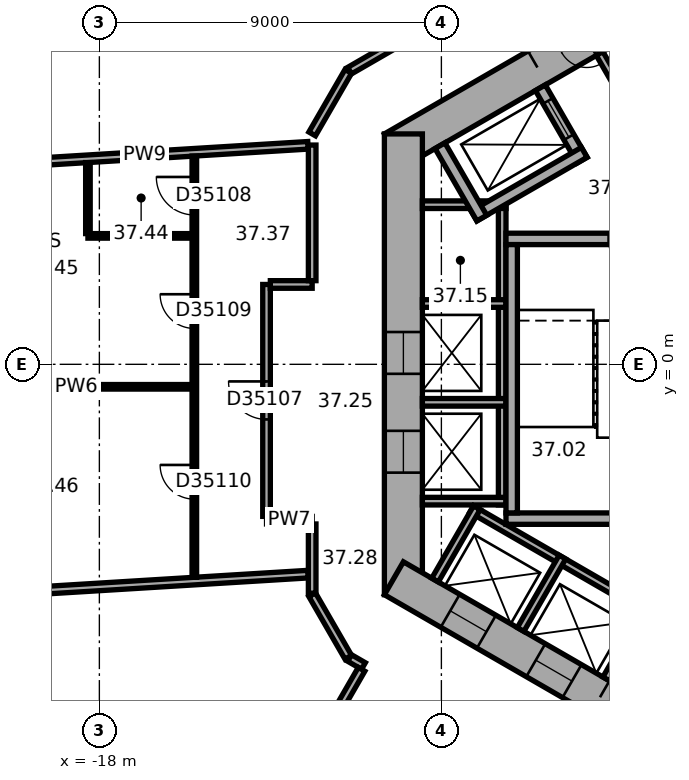
"""IFC4 building model, lengths in metres.
Left out: names, types, materials, properties, quantities, classifications, styles, units other than length and angle.
Written with IfcOpenShell. Run it as: python <this file> out.ifc"""

import sys

from ifc_helpers import new_model, si_unit, direction, frame, frame_2d, origin, place, context, subcontext, project, spatial, rectangle, extrude, element, fill, save


model = new_model("IFC4")
c1 = context("Model", 3, precision=1e-05, world=origin(), true_north=direction((0.0, 1.0)))
c2 = subcontext(c1, "Body", "Model", "MODEL_VIEW")
j1 = project(units=[si_unit("LENGTHUNIT", "METRE"), si_unit("PLANEANGLEUNIT", "RADIAN")], contexts=[c1])
p1 = place(None, origin())
s1 = spatial("IfcSite", under=j1, at=p1, CompositionType="ELEMENT")
p2 = place(p1, origin())
s2 = spatial("IfcBuilding", under=s1, at=p2, CompositionType="ELEMENT")
p3 = place(p2, frame((0.0, 0.0, 154.0)))
s3 = spatial("IfcBuildingStorey", under=s2, at=p3, CompositionType="ELEMENT", Elevation=154.0)
p4 = place(p3, frame((0.25, 11.691, 0.0), z_axis=(0.0, 0.0, 1.0), x_axis=(-0.866022616891, -0.50000482701, 0.0)))
e1 = element("IfcWall", 1, at=p4, inside=s3, PredefinedType="SHEAR", context=c2, shape_type="SweptSolid", body=[
    extrude(rectangle(XDim=12.125, YDim=1.0, at=frame_2d((6.062, 0.0))), origin(), (0.0, 0.0, 1.0), 3.7),
])
p5 = place(p4, frame((6.262, 0.0, 0.0)))
e2 = element("IfcOpeningElement", 2, at=p5, cuts=e1, PredefinedType="OPENING", context=c2, shape_type="SweptSolid", body=[
    extrude(rectangle(XDim=1.5, YDim=2.1, at=frame_2d((0.75, 1.05))), frame((0.0, 0.51, 0.0), z_axis=(0.0, -1.0, 0.0), x_axis=(1.0, 0.0, 0.0)), (0.0, 0.0, 1.0), 1.02),
])
p6 = place(p4, frame((1.812, 0.0, 0.0)))
e3 = element("IfcOpeningElement", 3, at=p6, cuts=e1, PredefinedType="OPENING", context=c2, shape_type="SweptSolid", body=[
    extrude(rectangle(XDim=0.9, YDim=2.1, at=frame_2d((0.45, 1.05))), frame((0.0, 0.51, 0.0), z_axis=(0.0, -1.0, 0.0), x_axis=(1.0, 0.0, 0.0)), (0.0, 0.0, 1.0), 1.02),
])
p7 = place(p4, frame((4.412, 0.0, 0.0)))
e4 = element("IfcOpeningElement", 4, at=p7, cuts=e1, PredefinedType="OPENING", context=c2, shape_type="SweptSolid", body=[
    extrude(rectangle(XDim=0.9, YDim=2.1, at=frame_2d((0.45, 1.05))), frame((0.0, 0.51, 0.0), z_axis=(0.0, -1.0, 0.0), x_axis=(1.0, 0.0, 0.0)), (0.0, 0.0, 1.0), 1.02),
])
p8 = place(p3, frame((-10.0, 6.062, 0.0), z_axis=(0.0, 0.0, 1.0), x_axis=(0.0, -1.0, 0.0)))
e5 = element("IfcWall", 5, at=p8, inside=s3, PredefinedType="SHEAR", context=c2, shape_type="SweptSolid", body=[
    extrude(rectangle(XDim=12.125, YDim=1.0, at=frame_2d((6.062, 0.0))), origin(), (0.0, 0.0, 1.0), 3.7),
])
p9 = place(p8, frame((5.212, 0.0, 0.0)))
e6 = element("IfcOpeningElement", 6, at=p9, cuts=e5, PredefinedType="OPENING", context=c2, shape_type="SweptSolid", body=[
    extrude(rectangle(XDim=1.1, YDim=2.1, at=frame_2d((0.55, 1.05))), frame((0.0, 0.51, 0.0), z_axis=(0.0, -1.0, 0.0), x_axis=(1.0, 0.0, 0.0)), (0.0, 0.0, 1.0), 1.02),
])
p10 = place(p8, frame((7.812, 0.0, 0.0)))
e7 = element("IfcOpeningElement", 7, at=p10, cuts=e5, PredefinedType="OPENING", context=c2, shape_type="SweptSolid", body=[
    extrude(rectangle(XDim=1.1, YDim=2.1, at=frame_2d((0.55, 1.05))), frame((0.0, 0.51, 0.0), z_axis=(0.0, -1.0, 0.0), x_axis=(1.0, 0.0, 0.0)), (0.0, 0.0, 1.0), 1.02),
])
p11 = place(p3, frame((-10.25, -5.629, 0.0), z_axis=(0.0, 0.0, 1.0), x_axis=(0.866022616891, -0.50000482701, 0.0)))
e8 = element("IfcWall", 8, at=p11, inside=s3, PredefinedType="SHEAR", context=c2, shape_type="SweptSolid", body=[
    extrude(rectangle(XDim=12.125, YDim=1.0, at=frame_2d((6.062, 0.0))), origin(), (0.0, 0.0, 1.0), 3.7),
])
p12 = place(p11, frame((6.262, 0.0, 0.0)))
e9 = element("IfcOpeningElement", 9, at=p12, cuts=e8, PredefinedType="OPENING", context=c2, shape_type="SweptSolid", body=[
    extrude(rectangle(XDim=1.5, YDim=2.1, at=frame_2d((0.75, 1.05))), frame((0.0, 0.51, 0.0), z_axis=(0.0, -1.0, 0.0), x_axis=(1.0, 0.0, 0.0)), (0.0, 0.0, 1.0), 1.02),
])
p13 = place(p11, frame((1.712, 0.0, 0.0)))
e10 = element("IfcOpeningElement", 10, at=p13, cuts=e8, PredefinedType="OPENING", context=c2, shape_type="SweptSolid", body=[
    extrude(rectangle(XDim=1.1, YDim=2.1, at=frame_2d((0.55, 1.05))), frame((0.0, 0.51, 0.0), z_axis=(0.0, -1.0, 0.0), x_axis=(1.0, 0.0, 0.0)), (0.0, 0.0, 1.0), 1.02),
])
p14 = place(p11, frame((4.312, 0.0, 0.0)))
e11 = element("IfcOpeningElement", 11, at=p14, cuts=e8, PredefinedType="OPENING", context=c2, shape_type="SweptSolid", body=[
    extrude(rectangle(XDim=1.1, YDim=2.1, at=frame_2d((0.55, 1.05))), frame((0.0, 0.51, 0.0), z_axis=(0.0, -1.0, 0.0), x_axis=(1.0, 0.0, 0.0)), (0.0, 0.0, 1.0), 1.02),
])
p15 = place(p3, frame((-3.737, 6.272, 0.0), z_axis=(0.0, 0.0, 1.0), x_axis=(-0.50002983664, 0.866008176907, 0.0)))
e12 = element("IfcWall", 12, at=p15, inside=s3, PredefinedType="PARTITIONING", context=c2, shape_type="SweptSolid", body=[
    extrude(rectangle(XDim=2.2, YDim=0.2, at=frame_2d((1.1, 0.0))), origin(), (0.0, 0.0, 1.0), 3.42),
])
p16 = place(p3, frame((-7.4, 4.3, 0.0), z_axis=(0.0, 0.0, 1.0), x_axis=(0.0, -1.0, 0.0)))
e13 = element("IfcWall", 13, at=p16, inside=s3, PredefinedType="PARTITIONING", context=c2, shape_type="SweptSolid", body=[
    extrude(rectangle(XDim=8.0, YDim=0.2, at=frame_2d((4.0, 0.0))), origin(), (0.0, 0.0, 1.0), 3.42),
])
for number, where, z_axis, x_axis in (
    (14, (-7.3, 4.2, 0.0), (0.0, 0.0, 1.0), (-1.0, 0.0, 0.0)),
    (15, (-7.3, 1.6, 0.0), (0.0, 0.0, 1.0), (-1.0, 0.0, 0.0)),
    (16, (-7.3, -1.0, 0.0), (0.0, 0.0, 1.0), (-1.0, 0.0, 0.0)),
    (17, (-7.3, -3.6, 0.0), (0.0, 0.0, 1.0), (-1.0, 0.0, 0.0)),
):
    element("IfcWall", number, at=place(p3, frame(where, z_axis=z_axis, x_axis=x_axis)), inside=s3, PredefinedType="PARTITIONING", context=c2, shape_type="SweptSolid", body=[
        extrude(rectangle(XDim=2.2, YDim=0.2, at=frame_2d((1.1, 0.0))), origin(), (0.0, 0.0, 1.0), 3.42),
    ])
p17 = place(p3, frame((-8.203, -3.809, 0.0), z_axis=(0.0, 0.0, 1.0), x_axis=(0.866028230842, -0.499995103361, 0.0)))
e18 = element("IfcWall", 18, at=p17, inside=s3, PredefinedType="PARTITIONING", context=c2, shape_type="SweptSolid", body=[
    extrude(rectangle(XDim=5.4, YDim=0.2, at=frame_2d((2.7, 0.0))), origin(), (0.0, 0.0, 1.0), 3.42),
])
for number, where, z_axis, x_axis in (
    (19, (-8.067, -3.772, 0.0), (0.0, 0.0, 1.0), (-0.5, -0.866, 0.0)),
    (20, (-5.815, -5.072, 0.0), (0.0, 0.0, 1.0), (-0.5, -0.866, 0.0)),
):
    element("IfcWall", number, at=place(p3, frame(where, z_axis=z_axis, x_axis=x_axis)), inside=s3, PredefinedType="PARTITIONING", context=c2, shape_type="SweptSolid", body=[
        extrude(rectangle(XDim=2.2, YDim=0.2, at=frame_2d((1.1, 0.0))), origin(), (0.0, 0.0, 1.0), 3.42),
    ])
p18 = place(p3, frame((-3.563, -6.372, 0.0), z_axis=(0.0, 0.0, 1.0), x_axis=(-0.499994660107, -0.866028486751, 0.0)))
e21 = element("IfcWall", 21, at=p18, inside=s3, PredefinedType="PARTITIONING", context=c2, shape_type="SweptSolid", body=[
    extrude(rectangle(XDim=2.2, YDim=0.2, at=frame_2d((1.1, 0.0))), origin(), (0.0, 0.0, 1.0), 3.42),
])
p19 = place(p3, frame((-2.6, 3.3, 0.0), z_axis=(0.0, 0.0, 1.0), x_axis=(-1.0, 0.0, 0.0)))
e22 = element("IfcWall", 22, at=p19, inside=s3, PredefinedType="SHEAR", context=c2, shape_type="SweptSolid", body=[
    extrude(rectangle(XDim=4.7, YDim=0.3, at=frame_2d((2.35, 0.0))), origin(), (0.0, 0.0, 1.0), 3.42),
])
p20 = place(p19, frame((0.8, 0.0, 0.0)))
e23 = element("IfcOpeningElement", 23, at=p20, cuts=e22, PredefinedType="OPENING", context=c2, shape_type="SweptSolid", body=[
    extrude(rectangle(XDim=1.2, YDim=2.1, at=frame_2d((0.6, 1.05))), frame((0.0, 0.16, 0.0), z_axis=(0.0, -1.0, 0.0), x_axis=(1.0, 0.0, 0.0)), (0.0, 0.0, 1.0), 0.32),
])
p21 = place(p3, frame((-2.6, -4.06, 0.0), z_axis=(0.0, 0.0, 1.0), x_axis=(-1.0, 0.0, 0.0)))
e24 = element("IfcWall", 24, at=p21, inside=s3, PredefinedType="SHEAR", context=c2, shape_type="SweptSolid", body=[
    extrude(rectangle(XDim=4.7, YDim=0.3, at=frame_2d((2.35, 0.0))), origin(), (0.0, 0.0, 1.0), 3.42),
])
p22 = place(p3, frame((-7.15, 3.15, 0.0), z_axis=(0.0, 0.0, 1.0), x_axis=(0.0, -1.0, 0.0)))
e25 = element("IfcWall", 25, at=p22, inside=s3, PredefinedType="SHEAR", context=c2, shape_type="SweptSolid", body=[
    extrude(rectangle(XDim=7.06, YDim=0.3, at=frame_2d((3.53, 0.0))), origin(), (0.0, 0.0, 1.0), 3.42),
])
p23 = place(p3, frame((-5.295, 5.372, 0.0), z_axis=(0.0, 0.0, 1.0), x_axis=(-0.500077893725, 0.86598042715, 0.0)))
e26 = element("IfcWall", 26, at=p23, inside=s3, PredefinedType="SHEAR", context=c2, shape_type="SweptSolid", body=[
    extrude(rectangle(XDim=2.2, YDim=0.3, at=frame_2d((1.1, 0.0))), origin(), (0.0, 0.0, 1.0), 3.42),
])
p24 = place(p23, frame((0.7, 0.0, 0.0)))
e27 = element("IfcOpeningElement", 27, at=p24, cuts=e26, PredefinedType="OPENING", context=c2, shape_type="SweptSolid", body=[
    extrude(rectangle(XDim=1.1, YDim=2.1, at=frame_2d((0.55, 1.05))), frame((0.0, 0.16, 0.0), z_axis=(0.0, -1.0, 0.0), x_axis=(1.0, 0.0, 0.0)), (0.0, 0.0, 1.0), 0.32),
])
p25 = place(p3, frame((-5.24, 5.577, 0.0), z_axis=(0.0, 0.0, 1.0), x_axis=(-0.866014461049, -0.500018952895, 0.0)))
e28 = element("IfcWall", 28, at=p25, inside=s3, PredefinedType="SHEAR", context=c2, shape_type="SweptSolid", body=[
    extrude(rectangle(XDim=3.35, YDim=0.3, at=frame_2d((1.675, 0.0))), origin(), (0.0, 0.0, 1.0), 3.42),
])
p26 = place(p3, frame((-7.937, 3.847, 0.0), z_axis=(0.0, 0.0, 1.0), x_axis=(-0.50002983664, 0.866008176907, 0.0)))
e29 = element("IfcWall", 29, at=p26, inside=s3, PredefinedType="SHEAR", context=c2, shape_type="SweptSolid", body=[
    extrude(rectangle(XDim=2.2, YDim=0.3, at=frame_2d((1.1, 0.0))), origin(), (0.0, 0.0, 1.0), 3.42),
])
p27 = place(p3, frame((-21.654, -0.592, 0.0), z_axis=(0.0, 0.0, 1.0), x_axis=(1.0, 0.0, 0.0)))
e30 = element("IfcWall", 30, at=p27, inside=s3, PredefinedType="PARTITIONING", context=c2, shape_type="SweptSolid", body=[
    extrude(rectangle(XDim=6.093, YDim=0.12, at=frame_2d((3.046, 0.0))), origin(), (0.0, 0.0, 1.0), 3.42),
])
p28 = place(p3, frame((-21.109, 5.237, 0.0), z_axis=(0.0, 0.0, 1.0), x_axis=(0.998135264293, 0.061040922131, 0.0)))
e31 = element("IfcWall", 31, at=p28, inside=s3, PredefinedType="PARTITIONING", context=c2, shape_type="SweptSolid", body=[
    extrude(rectangle(XDim=8.615, YDim=0.2, at=frame_2d((4.308, 0.0))), origin(), (0.0, 0.0, 1.0), 3.42),
])
p29 = place(p3, frame((-20.421, -6.005, 0.0), z_axis=(0.0, 0.0, 1.0), x_axis=(0.998134865741, 0.061047438866, 0.0)))
e32 = element("IfcWall", 32, at=p29, inside=s3, PredefinedType="PARTITIONING", context=c2, shape_type="SweptSolid", body=[
    extrude(rectangle(XDim=7.927, YDim=0.2, at=frame_2d((3.963, 0.0))), origin(), (0.0, 0.0, 1.0), 2.87),
])
p30 = place(p3, frame((-18.301, 3.38, 0.0), z_axis=(0.0, 0.0, 1.0), x_axis=(1.0, 0.0, 0.0)))
e33 = element("IfcWall", 33, at=p30, inside=s3, PredefinedType="PARTITIONING", context=c2, shape_type="SweptSolid", body=[
    extrude(rectangle(XDim=2.74, YDim=0.12, at=frame_2d((1.37, 0.0))), origin(), (0.0, 0.0, 1.0), 3.42),
])
p31 = place(p3, frame((-18.301, 5.308, 0.0), z_axis=(0.0, 0.0, 1.0), x_axis=(0.0, -1.0, 0.0)))
e34 = element("IfcWall", 34, at=p31, inside=s3, PredefinedType="PARTITIONING", context=c2, shape_type="SweptSolid", body=[
    extrude(rectangle(XDim=1.869, YDim=0.12, at=frame_2d((0.934, 0.0))), origin(), (0.0, 0.0, 1.0), 3.42),
])
p32 = place(p3, frame((-15.501, 5.479, 0.0), z_axis=(0.0, 0.0, 1.0), x_axis=(0.0, -1.0, 0.0)))
e35 = element("IfcWall", 35, at=p32, inside=s3, PredefinedType="PARTITIONING", context=c2, shape_type="SweptSolid", body=[
    extrude(rectangle(XDim=11.083, YDim=0.12, at=frame_2d((5.542, 0.0))), origin(), (0.0, 0.0, 1.0), 3.42),
])
p33 = place(p32, frame((0.55, 0.0, 0.0)))
e36 = element("IfcOpeningElement", 36, at=p33, cuts=e35, PredefinedType="OPENING", context=c2, shape_type="SweptSolid", body=[
    extrude(rectangle(XDim=1.0, YDim=2.1, at=frame_2d((0.5, 1.05))), frame((0.0, 0.07, 0.0), z_axis=(0.0, -1.0, 0.0), x_axis=(1.0, 0.0, 0.0)), (0.0, 0.0, 1.0), 0.14),
])
p34 = place(p32, frame((3.636, 0.0, 0.0)))
e37 = element("IfcOpeningElement", 37, at=p34, cuts=e35, PredefinedType="OPENING", context=c2, shape_type="SweptSolid", body=[
    extrude(rectangle(XDim=0.9, YDim=2.1, at=frame_2d((0.45, 1.05))), frame((0.0, 0.07, 0.0), z_axis=(0.0, -1.0, 0.0), x_axis=(1.0, 0.0, 0.0)), (0.0, 0.0, 1.0), 0.14),
])
p35 = place(p32, frame((8.127, 0.0, 0.0)))
e38 = element("IfcOpeningElement", 38, at=p35, cuts=e35, PredefinedType="OPENING", context=c2, shape_type="SweptSolid", body=[
    extrude(rectangle(XDim=0.9, YDim=2.1, at=frame_2d((0.45, 1.05))), frame((0.0, 0.07, 0.0), z_axis=(0.0, -1.0, 0.0), x_axis=(1.0, 0.0, 0.0)), (0.0, 0.0, 1.0), 0.14),
])
p36 = place(p3, frame((-13.601, -4.101, 0.0), z_axis=(0.0, 0.0, 1.0), x_axis=(1.0, 0.0, 0.0)))
e39 = element("IfcWall", 39, at=p36, inside=s3, PredefinedType="PARTITIONING", context=c2, shape_type="SweptSolid", body=[
    extrude(rectangle(XDim=1.201, YDim=0.2, at=frame_2d((0.601, 0.0))), origin(), (0.0, 0.0, 1.0), 3.42),
])
p37 = place(p3, frame((-13.601, 2.101, 0.0), z_axis=(0.0, 0.0, 1.0), x_axis=(0.0, -1.0, 0.0)))
e40 = element("IfcWall", 40, at=p37, inside=s3, PredefinedType="PARTITIONING", context=c2, shape_type="SweptSolid", body=[
    extrude(rectangle(XDim=6.102, YDim=0.2, at=frame_2d((3.051, 0.0))), origin(), (0.0, 0.0, 1.0), 3.42),
])
p38 = place(p37, frame((2.551, 0.0, 0.0)))
e41 = element("IfcOpeningElement", 41, at=p38, cuts=e40, PredefinedType="OPENING", context=c2, shape_type="SweptSolid", body=[
    extrude(rectangle(XDim=1.0, YDim=2.1, at=frame_2d((0.5, 1.05))), frame((0.0, 0.11, 0.0), z_axis=(0.0, -1.0, 0.0), x_axis=(1.0, 0.0, 0.0)), (0.0, 0.0, 1.0), 0.22),
])
p39 = place(p3, frame((-12.4, -6.062, 0.0), z_axis=(0.0, 0.0, 1.0), x_axis=(0.500022797313, -0.86601224135, 0.0)))
e42 = element("IfcWall", 42, at=p39, inside=s3, PredefinedType="PARTITIONING", context=c2, shape_type="SweptSolid", body=[
    extrude(rectangle(XDim=1.9, YDim=0.2, at=frame_2d((0.95, 0.0))), origin(), (0.0, 0.0, 1.0), 3.42),
])
p40 = place(p3, frame((-12.4, -4.201, 0.0), z_axis=(0.0, 0.0, 1.0), x_axis=(0.0, -1.0, 0.0)))
e43 = element("IfcWall", 43, at=p40, inside=s3, PredefinedType="PARTITIONING", context=c2, shape_type="SweptSolid", body=[
    extrude(rectangle(XDim=1.821, YDim=0.2, at=frame_2d((0.911, 0.0))), origin(), (0.0, 0.0, 1.0), 3.42),
])
p41 = place(p3, frame((-12.4, 2.101, 0.0), z_axis=(0.0, 0.0, 1.0), x_axis=(-1.0, 0.0, 0.0)))
e44 = element("IfcWall", 44, at=p41, inside=s3, PredefinedType="PARTITIONING", context=c2, shape_type="SweptSolid", body=[
    extrude(rectangle(XDim=1.101, YDim=0.2, at=frame_2d((0.551, 0.0))), origin(), (0.0, 0.0, 1.0), 3.42),
])
p42 = place(p3, frame((-12.4, 5.769, 0.0), z_axis=(0.0, 0.0, 1.0), x_axis=(0.0, -1.0, 0.0)))
e45 = element("IfcWall", 45, at=p42, inside=s3, PredefinedType="PARTITIONING", context=c2, shape_type="SweptSolid", body=[
    extrude(rectangle(XDim=3.568, YDim=0.2, at=frame_2d((1.784, 0.0))), origin(), (0.0, 0.0, 1.0), 3.42),
])
p43 = place(p3, frame((-11.45, 7.708, 0.0), z_axis=(0.0, 0.0, 1.0), x_axis=(-0.500022797313, -0.86601224135, 0.0)))
e46 = element("IfcWall", 46, at=p43, inside=s3, PredefinedType="PARTITIONING", context=c2, shape_type="SweptSolid", body=[
    extrude(rectangle(XDim=1.9, YDim=0.2, at=frame_2d((0.95, 0.0))), origin(), (0.0, 0.0, 1.0), 3.42),
])
p44 = place(p3, frame((-11.415, -7.728, 0.0), z_axis=(0.0, 0.0, 1.0), x_axis=(0.865915281873, -0.500190688257, 0.0)))
e47 = element("IfcWall", 47, at=p44, inside=s3, PredefinedType="PARTITIONING", context=c2, shape_type="SweptSolid", body=[
    extrude(rectangle(XDim=0.421, YDim=0.2, at=frame_2d((0.21, 0.0))), origin(), (0.0, 0.0, 1.0), 3.42),
])
p45 = place(p3, frame((-11.101, -8.025, 0.0), z_axis=(0.0, 0.0, 1.0), x_axis=(-0.500074377092, -0.865982457891, 0.0)))
e48 = element("IfcWall", 48, at=p45, inside=s3, PredefinedType="PARTITIONING", context=c2, shape_type="SweptSolid", body=[
    extrude(rectangle(XDim=1.101, YDim=0.2, at=frame_2d((0.55, 0.0))), origin(), (0.0, 0.0, 1.0), 3.42),
])
p46 = place(p3, frame((-8.678, 9.308, 0.0), z_axis=(0.0, 0.0, 1.0), x_axis=(-0.866000359435, -0.500043375578, 0.0)))
e49 = element("IfcWall", 49, at=p46, inside=s3, PredefinedType="PARTITIONING", context=c2, shape_type="SweptSolid", body=[
    extrude(rectangle(XDim=3.161, YDim=0.2, at=frame_2d((1.581, 0.0))), origin(), (0.0, 0.0, 1.0), 3.42),
])
p47 = place(p5, origin())
e50 = element("IfcDoor", 50, at=p47, inside=s3, OperationType="DOUBLE_DOOR_SINGLE_SWING", PredefinedType="DOOR", context=c2, shape_type="SweptSolid", body=[
    extrude(rectangle(XDim=1.5, YDim=2.1, at=frame_2d((0.75, 1.05))), frame((0.0, 0.025, 0.0), z_axis=(0.0, -1.0, 0.0), x_axis=(1.0, 0.0, 0.0)), (0.0, 0.0, 1.0), 0.05),
])
fill(e2, e50)
p48 = place(p12, origin())
e51 = element("IfcDoor", 51, at=p48, inside=s3, OperationType="DOUBLE_DOOR_SINGLE_SWING", PredefinedType="DOOR", context=c2, shape_type="SweptSolid", body=[
    extrude(rectangle(XDim=1.5, YDim=2.1, at=frame_2d((0.75, 1.05))), frame((0.0, 0.025, 0.0), z_axis=(0.0, -1.0, 0.0), x_axis=(1.0, 0.0, 0.0)), (0.0, 0.0, 1.0), 0.05),
])
fill(e9, e51)
p49 = place(p20, origin())
e52 = element("IfcDoor", 52, at=p49, inside=s3, OperationType="SINGLE_SWING_RIGHT", PredefinedType="DOOR", context=c2, shape_type="SweptSolid", body=[
    extrude(rectangle(XDim=1.2, YDim=2.1, at=frame_2d((0.6, 1.05))), frame((0.0, 0.025, 0.0), z_axis=(0.0, -1.0, 0.0), x_axis=(1.0, 0.0, 0.0)), (0.0, 0.0, 1.0), 0.05),
])
fill(e23, e52)
p50 = place(p24, origin())
e53 = element("IfcDoor", 53, at=p50, inside=s3, OperationType="DOUBLE_DOOR_SLIDING", PredefinedType="DOOR", context=c2, shape_type="SweptSolid", body=[
    extrude(rectangle(XDim=1.1, YDim=2.1, at=frame_2d((0.55, 1.05))), frame((0.0, 0.025, 0.0), z_axis=(0.0, -1.0, 0.0), x_axis=(1.0, 0.0, 0.0)), (0.0, 0.0, 1.0), 0.05),
])
fill(e27, e53)
p51 = place(p9, origin())
e54 = element("IfcDoor", 54, at=p51, inside=s3, OperationType="DOUBLE_DOOR_SLIDING", PredefinedType="DOOR", context=c2, shape_type="SweptSolid", body=[
    extrude(rectangle(XDim=1.1, YDim=2.1, at=frame_2d((0.55, 1.05))), frame((0.0, 0.025, 0.0), z_axis=(0.0, -1.0, 0.0), x_axis=(1.0, 0.0, 0.0)), (0.0, 0.0, 1.0), 0.05),
])
fill(e6, e54)
p52 = place(p10, origin())
e55 = element("IfcDoor", 55, at=p52, inside=s3, OperationType="DOUBLE_DOOR_SLIDING", PredefinedType="DOOR", context=c2, shape_type="SweptSolid", body=[
    extrude(rectangle(XDim=1.1, YDim=2.1, at=frame_2d((0.55, 1.05))), frame((0.0, 0.025, 0.0), z_axis=(0.0, -1.0, 0.0), x_axis=(1.0, 0.0, 0.0)), (0.0, 0.0, 1.0), 0.05),
])
fill(e7, e55)
p53 = place(p13, origin())
e56 = element("IfcDoor", 56, at=p53, inside=s3, OperationType="DOUBLE_DOOR_SLIDING", PredefinedType="DOOR", context=c2, shape_type="SweptSolid", body=[
    extrude(rectangle(XDim=1.1, YDim=2.1, at=frame_2d((0.55, 1.05))), frame((0.0, 0.025, 0.0), z_axis=(0.0, -1.0, 0.0), x_axis=(1.0, 0.0, 0.0)), (0.0, 0.0, 1.0), 0.05),
])
fill(e10, e56)
p54 = place(p14, origin())
e57 = element("IfcDoor", 57, at=p54, inside=s3, OperationType="DOUBLE_DOOR_SLIDING", PredefinedType="DOOR", context=c2, shape_type="SweptSolid", body=[
    extrude(rectangle(XDim=1.1, YDim=2.1, at=frame_2d((0.55, 1.05))), frame((0.0, 0.025, 0.0), z_axis=(0.0, -1.0, 0.0), x_axis=(1.0, 0.0, 0.0)), (0.0, 0.0, 1.0), 0.05),
])
fill(e11, e57)
p55 = place(p38, origin())
e58 = element("IfcDoor", 58, at=p55, inside=s3, OperationType="SINGLE_SWING_LEFT", PredefinedType="DOOR", context=c2, shape_type="SweptSolid", body=[
    extrude(rectangle(XDim=1.0, YDim=2.1, at=frame_2d((0.5, 1.05))), frame((0.0, 0.025, 0.0), z_axis=(0.0, -1.0, 0.0), x_axis=(1.0, 0.0, 0.0)), (0.0, 0.0, 1.0), 0.05),
])
fill(e41, e58)
p56 = place(p33, origin())
e59 = element("IfcDoor", 59, at=p56, inside=s3, OperationType="SINGLE_SWING_LEFT", PredefinedType="DOOR", context=c2, shape_type="SweptSolid", body=[
    extrude(rectangle(XDim=1.0, YDim=2.1, at=frame_2d((0.5, 1.05))), frame((0.0, 0.025, 0.0), z_axis=(0.0, -1.0, 0.0), x_axis=(1.0, 0.0, 0.0)), (0.0, 0.0, 1.0), 0.05),
])
fill(e36, e59)
p57 = place(p34, origin())
e60 = element("IfcDoor", 60, at=p57, inside=s3, OperationType="SINGLE_SWING_LEFT", PredefinedType="DOOR", context=c2, shape_type="SweptSolid", body=[
    extrude(rectangle(XDim=0.9, YDim=2.1, at=frame_2d((0.45, 1.05))), frame((0.0, 0.025, 0.0), z_axis=(0.0, -1.0, 0.0), x_axis=(1.0, 0.0, 0.0)), (0.0, 0.0, 1.0), 0.05),
])
fill(e37, e60)
p58 = place(p35, origin())
e61 = element("IfcDoor", 61, at=p58, inside=s3, OperationType="SINGLE_SWING_LEFT", PredefinedType="DOOR", context=c2, shape_type="SweptSolid", body=[
    extrude(rectangle(XDim=0.9, YDim=2.1, at=frame_2d((0.45, 1.05))), frame((0.0, 0.025, 0.0), z_axis=(0.0, -1.0, 0.0), x_axis=(1.0, 0.0, 0.0)), (0.0, 0.0, 1.0), 0.05),
])
fill(e38, e61)
save(model, sys.argv[1])
